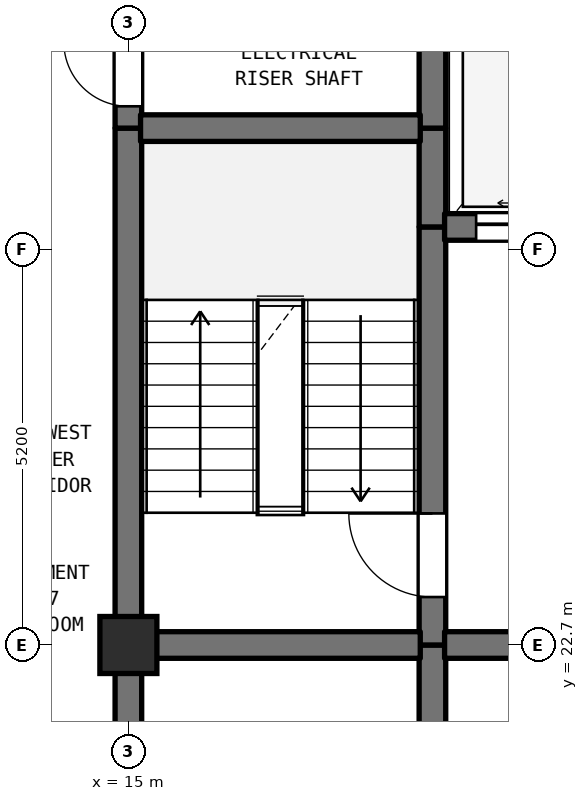
"""IFC4 building model, lengths in metres.
Left out: names, types, materials, properties, quantities, classifications, styles, units other than length and angle.
Written with IfcOpenShell. Run it as: python <this file> out.ifc"""

import sys

from ifc_helpers import new_model, si_unit, direction, frame, frame_2d, origin, origin_2d, place, context, subcontext, project, spatial, rectangle, extrude, element, fill, save


model = new_model("IFC4")
c1 = context("Model", 3, precision=1e-05, world=origin(), true_north=direction((0.0, 1.0)))
c2 = subcontext(c1, "Body", "Model", "MODEL_VIEW")
j1 = project(units=[si_unit("LENGTHUNIT", "METRE"), si_unit("PLANEANGLEUNIT", "RADIAN")], contexts=[c1])
p1 = place(None, origin())
s1 = spatial("IfcSite", under=j1, at=p1, CompositionType="ELEMENT")
p2 = place(p1, origin())
s2 = spatial("IfcBuilding", under=s1, at=p2, CompositionType="ELEMENT")
p3 = place(p2, frame((0.0, 0.0, 265.8)))
s3 = spatial("IfcBuildingStorey", under=s2, at=p3, CompositionType="ELEMENT", Elevation=265.8)
p4 = place(p3, frame((15.0, 22.7, 0.0), z_axis=(0.0, 0.0, 1.0), x_axis=(1.0, 0.0, 0.0)))
e1 = element("IfcColumn", 1, at=p4, inside=s3, PredefinedType="COLUMN", context=c2, shape_type="SweptSolid", body=[
    extrude(rectangle(XDim=0.75, YDim=0.75, at=origin_2d()), origin(), (0.0, 0.0, 1.0), 3.7),
])
p5 = place(p3, frame((15.0, 19.5, 0.0), z_axis=(0.0, 0.0, 1.0), x_axis=(0.0, 1.0, 0.0)))
e2 = element("IfcWall", 2, at=p5, inside=s3, PredefinedType="SHEAR", context=c2, shape_type="SweptSolid", body=[
    extrude(rectangle(XDim=3.2, YDim=0.35, at=frame_2d((1.6, 0.0))), origin(), (0.0, 0.0, 1.0), 3.39),
])
p6 = place(p3, frame((15.0, 22.7, 0.0), z_axis=(0.0, 0.0, 1.0), x_axis=(0.0, 1.0, 0.0)))
e3 = element("IfcWall", 3, at=p6, inside=s3, PredefinedType="SHEAR", context=c2, shape_type="SweptSolid", body=[
    extrude(rectangle(XDim=6.8, YDim=0.35, at=frame_2d((3.4, 0.0))), origin(), (0.0, 0.0, 1.0), 3.39),
])
p7 = place(p3, frame((15.0, 29.5, 0.0), z_axis=(0.0, 0.0, 1.0), x_axis=(0.0, 1.0, 0.0)))
e4 = element("IfcWall", 4, at=p7, inside=s3, PredefinedType="SHEAR", context=c2, shape_type="SweptSolid", body=[
    extrude(rectangle(XDim=1.6, YDim=0.35, at=frame_2d((0.8, 0.0))), origin(), (0.0, 0.0, 1.0), 3.39),
])
p8 = place(p7, frame((0.287, 0.0, 0.0)))
e5 = element("IfcOpeningElement", 5, at=p8, cuts=e4, PredefinedType="OPENING", context=c2, shape_type="SweptSolid", body=[
    extrude(rectangle(XDim=0.85, YDim=2.1, at=frame_2d((0.425, 1.05))), frame((0.0, 0.185, 0.0), z_axis=(0.0, -1.0, 0.0), x_axis=(1.0, 0.0, 0.0)), (0.0, 0.0, 1.0), 0.37),
])
p9 = place(p3, frame((19.0, 19.5, 0.0), z_axis=(0.0, 0.0, 1.0), x_axis=(0.0, 1.0, 0.0)))
e6 = element("IfcWall", 6, at=p9, inside=s3, PredefinedType="SHEAR", context=c2, shape_type="SweptSolid", body=[
    extrude(rectangle(XDim=3.2, YDim=0.35, at=frame_2d((1.6, 0.0))), origin(), (0.0, 0.0, 1.0), 3.39),
])
p10 = place(p3, frame((19.0, 22.7, 0.0), z_axis=(0.0, 0.0, 1.0), x_axis=(0.0, 1.0, 0.0)))
e7 = element("IfcWall", 7, at=p10, inside=s3, PredefinedType="SHEAR", context=c2, shape_type="SweptSolid", body=[
    extrude(rectangle(XDim=5.5, YDim=0.35, at=frame_2d((2.75, 0.0))), origin(), (0.0, 0.0, 1.0), 3.39),
])
p11 = place(p10, frame((0.631, 0.0, 0.0)))
e8 = element("IfcOpeningElement", 8, at=p11, cuts=e7, PredefinedType="OPENING", context=c2, shape_type="SweptSolid", body=[
    extrude(rectangle(XDim=1.1, YDim=2.15, at=frame_2d((0.55, 1.075))), frame((0.0, 0.185, 0.0), z_axis=(0.0, -1.0, 0.0), x_axis=(1.0, 0.0, 0.0)), (0.0, 0.0, 1.0), 0.37),
])
p12 = place(p3, frame((19.0, 28.2, 0.0), z_axis=(0.0, 0.0, 1.0), x_axis=(0.0, 1.0, 0.0)))
e9 = element("IfcWall", 9, at=p12, inside=s3, PredefinedType="SHEAR", context=c2, shape_type="SweptSolid", body=[
    extrude(rectangle(XDim=1.3, YDim=0.35, at=frame_2d((0.65, 0.0))), origin(), (0.0, 0.0, 1.0), 3.39),
])
p13 = place(p3, frame((19.0, 29.5, 0.0), z_axis=(0.0, 0.0, 1.0), x_axis=(0.0, 1.0, 0.0)))
e10 = element("IfcWall", 10, at=p13, inside=s3, PredefinedType="SHEAR", context=c2, shape_type="SweptSolid", body=[
    extrude(rectangle(XDim=5.5, YDim=0.35, at=frame_2d((2.75, 0.0))), origin(), (0.0, 0.0, 1.0), 3.39),
])
p14 = place(p13, frame((2.025, 0.0, 0.0)))
e11 = element("IfcOpeningElement", 11, at=p14, cuts=e10, PredefinedType="OPENING", context=c2, shape_type="SweptSolid", body=[
    extrude(rectangle(XDim=1.1, YDim=2.15, at=frame_2d((0.55, 1.075))), frame((0.0, 0.185, 0.0), z_axis=(0.0, -1.0, 0.0), x_axis=(1.0, 0.0, 0.0)), (0.0, 0.0, 1.0), 0.37),
])
p15 = place(p3, frame((15.16, 22.7, 0.0), z_axis=(0.0, 0.0, 1.0), x_axis=(1.0, 0.0, 0.0)))
e12 = element("IfcWall", 12, at=p15, inside=s3, PredefinedType="SHEAR", context=c2, shape_type="SweptSolid", body=[
    extrude(rectangle(XDim=3.68, YDim=0.35, at=frame_2d((1.84, 0.0))), origin(), (0.0, 0.0, 1.0), 3.39),
])
p16 = place(p3, frame((19.16, 22.7, 0.0), z_axis=(0.0, 0.0, 1.0), x_axis=(1.0, 0.0, 0.0)))
e13 = element("IfcWall", 13, at=p16, inside=s3, PredefinedType="SHEAR", context=c2, shape_type="SweptSolid", body=[
    extrude(rectangle(XDim=4.48, YDim=0.35, at=frame_2d((2.24, 0.0))), origin(), (0.0, 0.0, 1.0), 3.39),
])
p17 = place(p16, frame((1.64, 0.0, 0.0)))
e14 = element("IfcOpeningElement", 14, at=p17, cuts=e13, PredefinedType="OPENING", context=c2, shape_type="SweptSolid", body=[
    extrude(rectangle(XDim=1.2, YDim=2.2, at=frame_2d((0.6, 1.1))), frame((0.0, 0.185, 0.0), z_axis=(0.0, -1.0, 0.0), x_axis=(1.0, 0.0, 0.0)), (0.0, 0.0, 1.0), 0.37),
])
p18 = place(p3, frame((19.16, 28.2, 0.0), z_axis=(0.0, 0.0, 1.0), x_axis=(1.0, 0.0, 0.0)))
e15 = element("IfcWall", 15, at=p18, inside=s3, PredefinedType="SHEAR", context=c2, shape_type="SweptSolid", body=[
    extrude(rectangle(XDim=4.48, YDim=0.35, at=frame_2d((2.24, 0.0))), origin(), (0.0, 0.0, 1.0), 3.39),
])
p19 = place(p18, frame((0.415, 0.0, 0.0)))
e16 = element("IfcOpeningElement", 16, at=p19, cuts=e15, PredefinedType="OPENING", context=c2, shape_type="SweptSolid", body=[
    extrude(rectangle(XDim=1.25, YDim=2.2, at=frame_2d((0.625, 1.1))), frame((0.0, 0.185, 0.0), z_axis=(0.0, -1.0, 0.0), x_axis=(1.0, 0.0, 0.0)), (0.0, 0.0, 1.0), 0.37),
])
p20 = place(p18, frame((2.815, 0.0, 0.0)))
e17 = element("IfcOpeningElement", 17, at=p20, cuts=e15, PredefinedType="OPENING", context=c2, shape_type="SweptSolid", body=[
    extrude(rectangle(XDim=1.25, YDim=2.2, at=frame_2d((0.625, 1.1))), frame((0.0, 0.185, 0.0), z_axis=(0.0, -1.0, 0.0), x_axis=(1.0, 0.0, 0.0)), (0.0, 0.0, 1.0), 0.37),
])
p21 = place(p3, frame((15.16, 29.5, 0.0), z_axis=(0.0, 0.0, 1.0), x_axis=(1.0, 0.0, 0.0)))
e18 = element("IfcWall", 18, at=p21, inside=s3, PredefinedType="SHEAR", context=c2, shape_type="SweptSolid", body=[
    extrude(rectangle(XDim=3.68, YDim=0.35, at=frame_2d((1.84, 0.0))), origin(), (0.0, 0.0, 1.0), 3.39),
])
p22 = place(p8, origin())
e19 = element("IfcDoor", 19, at=p22, inside=s3, OperationType="SINGLE_SWING_RIGHT", PredefinedType="DOOR", context=c2, shape_type="SweptSolid", body=[
    extrude(rectangle(XDim=0.85, YDim=2.1, at=frame_2d((0.425, 1.05))), frame((0.0, 0.025, 0.0), z_axis=(0.0, -1.0, 0.0), x_axis=(1.0, 0.0, 0.0)), (0.0, 0.0, 1.0), 0.05),
])
fill(e5, e19)
p23 = place(p11, origin())
e20 = element("IfcDoor", 20, at=p23, inside=s3, OperationType="SINGLE_SWING_RIGHT", PredefinedType="DOOR", context=c2, shape_type="SweptSolid", body=[
    extrude(rectangle(XDim=1.1, YDim=2.15, at=frame_2d((0.55, 1.075))), frame((0.0, 0.025, 0.0), z_axis=(0.0, -1.0, 0.0), x_axis=(1.0, 0.0, 0.0)), (0.0, 0.0, 1.0), 0.05),
])
fill(e8, e20)
p24 = place(p19, origin())
e21 = element("IfcDoor", 21, at=p24, inside=s3, OperationType="DOUBLE_DOOR_SLIDING", PredefinedType="DOOR", context=c2, shape_type="SweptSolid", body=[
    extrude(rectangle(XDim=1.25, YDim=2.2, at=frame_2d((0.625, 1.1))), frame((0.0, 0.025, 0.0), z_axis=(0.0, -1.0, 0.0), x_axis=(1.0, 0.0, 0.0)), (0.0, 0.0, 1.0), 0.05),
])
fill(e16, e21)
save(model, sys.argv[1])
